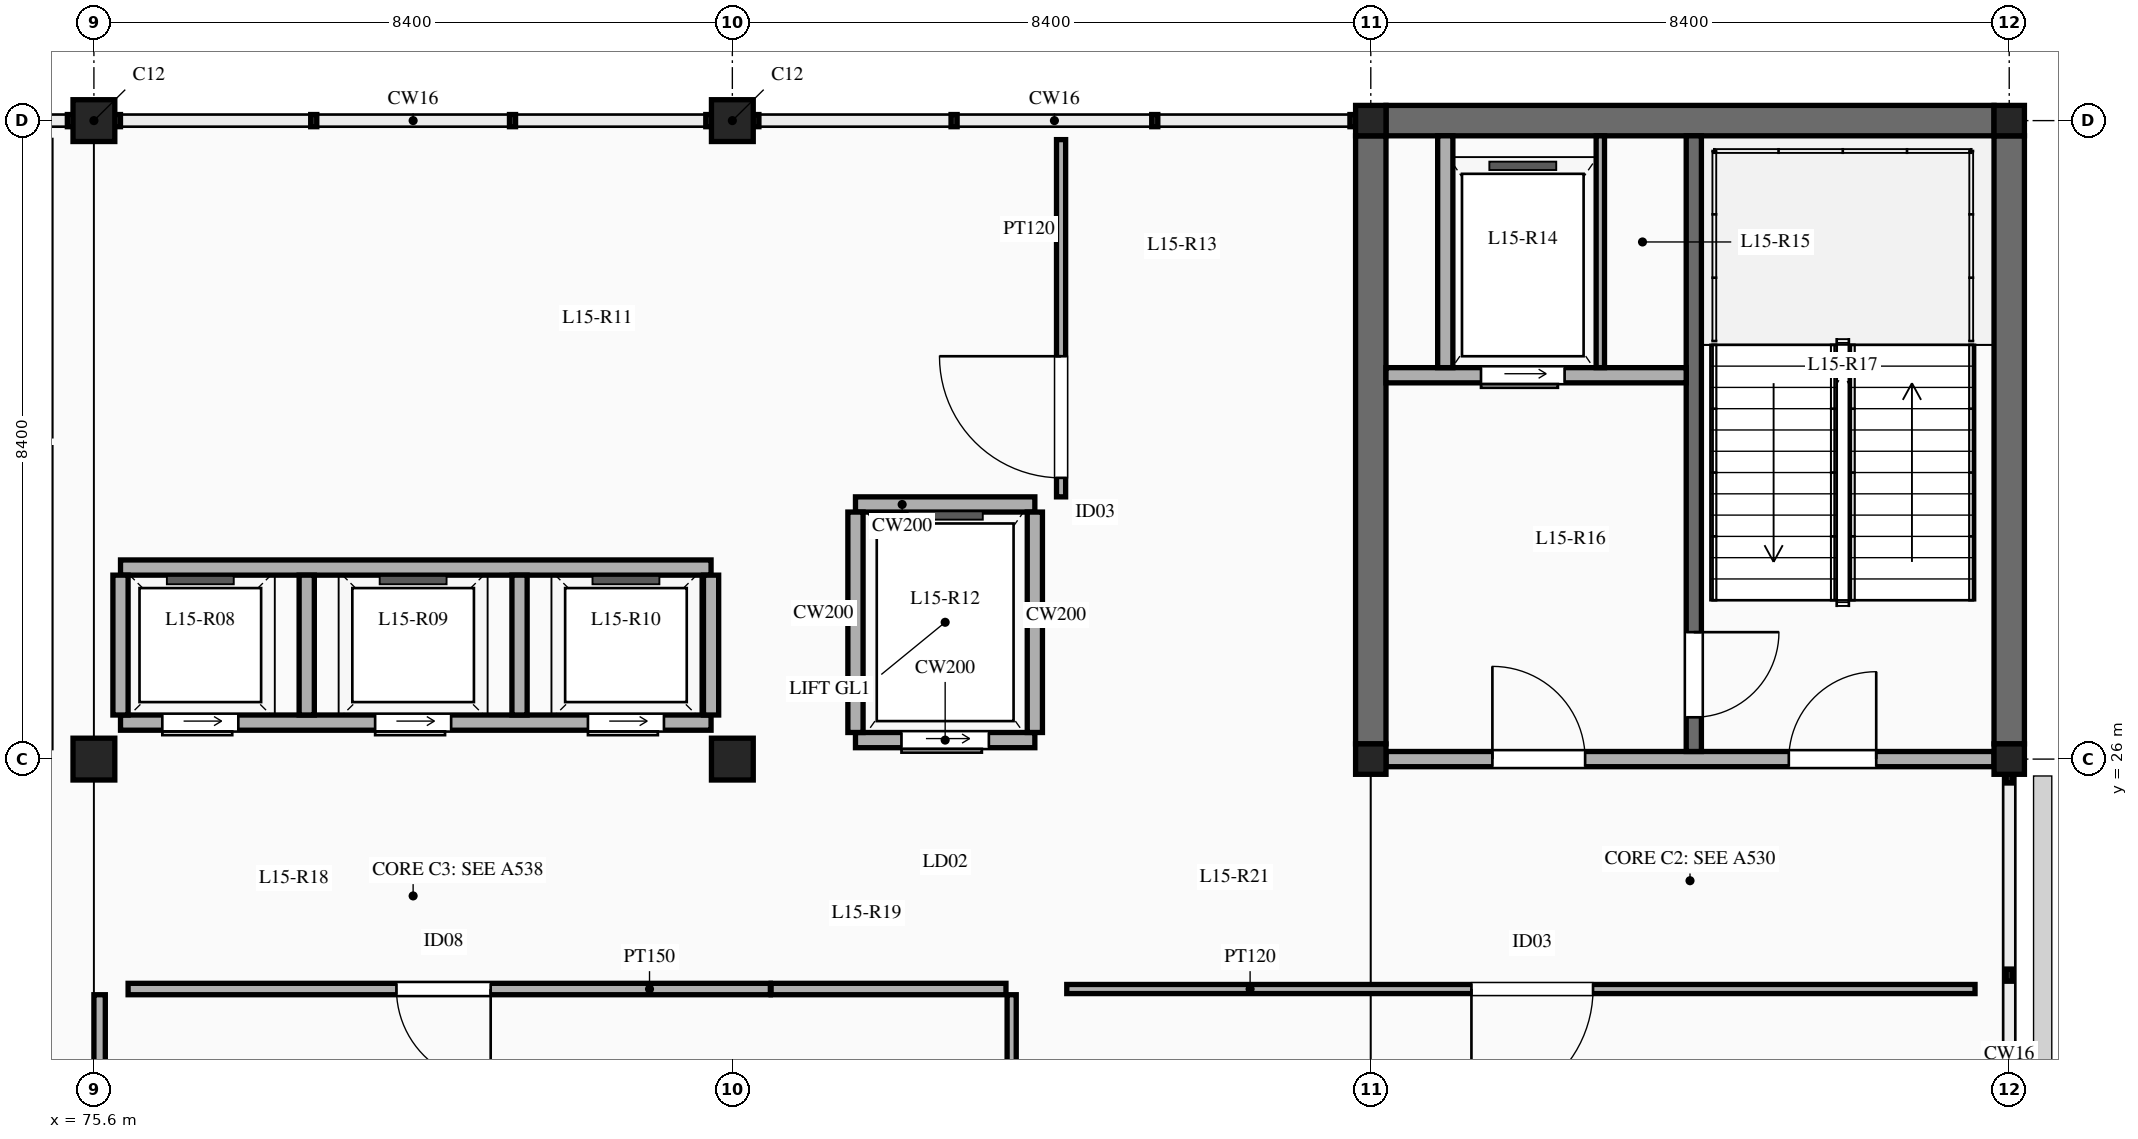
"""IFC4 building model, lengths in metres.
Left out: names, types, materials, properties, quantities, classifications, styles, units other than length and angle.
Written with IfcOpenShell. Run it as: python <this file> out.ifc"""

import sys

from ifc_helpers import new_model, si_unit, direction, frame, frame_2d, origin, origin_2d, place, context, subcontext, project, spatial, rectangle, extrude, element, fill, save


model = new_model("IFC4")
c1 = context("Model", 3, precision=1e-05, world=origin(), true_north=direction((0.0, 1.0)))
c2 = subcontext(c1, "Body", "Model", "MODEL_VIEW")
j1 = project(units=[si_unit("LENGTHUNIT", "METRE"), si_unit("PLANEANGLEUNIT", "RADIAN")], contexts=[c1])
p1 = place(None, origin())
s1 = spatial("IfcSite", under=j1, at=p1, CompositionType="ELEMENT")
p2 = place(p1, origin())
s2 = spatial("IfcBuilding", under=s1, at=p2, CompositionType="ELEMENT")
p3 = place(p2, frame((0.0, 0.0, 69.0)))
s3 = spatial("IfcBuildingStorey", under=s2, at=p3, CompositionType="ELEMENT", Elevation=69.0)
for number, where, z_axis, x_axis in (
    (1, (75.6, 26.0, 0.0), (0.0, 0.0, 1.0), (1.0, 0.0, 0.0)),
    (2, (75.6, 34.4, 0.0), (0.0, 0.0, 1.0), (1.0, 0.0, 0.0)),
    (3, (84.0, 26.0, 0.0), (0.0, 0.0, 1.0), (1.0, 0.0, 0.0)),
    (4, (84.0, 34.4, 0.0), (0.0, 0.0, 1.0), (1.0, 0.0, 0.0)),
):
    element("IfcColumn", number, at=place(p3, frame(where, z_axis=z_axis, x_axis=x_axis)), inside=s3, PredefinedType="COLUMN", context=c2, shape_type="SweptSolid", body=[
        extrude(rectangle(XDim=0.55, YDim=0.55, at=origin_2d()), origin(), (0.0, 0.0, 1.0), 4.5),
    ])
for number, where, z_axis, x_axis in (
    (5, (92.4, 26.0, 0.0), (0.0, 0.0, 1.0), (1.0, 0.0, 0.0)),
    (6, (92.4, 34.4, 0.0), (0.0, 0.0, 1.0), (1.0, 0.0, 0.0)),
    (7, (100.8, 26.0, 0.0), (0.0, 0.0, 1.0), (1.0, 0.0, 0.0)),
    (8, (100.8, 34.4, 0.0), (0.0, 0.0, 1.0), (1.0, 0.0, 0.0)),
):
    element("IfcColumn", number, at=place(p3, frame(where, z_axis=z_axis, x_axis=x_axis)), inside=s3, PredefinedType="COLUMN", context=c2, shape_type="SweptSolid", body=[
        extrude(rectangle(XDim=0.4, YDim=0.4, at=origin_2d()), origin(), (0.0, 0.0, 1.0), 4.5),
    ])
for number, where, z_axis, x_axis in (
    (9, (92.4, 26.2, 0.0), (0.0, 0.0, 1.0), (0.0, 1.0, 0.0)),
    (10, (100.8, 26.2, 0.0), (0.0, 0.0, 1.0), (0.0, 1.0, 0.0)),
    (11, (92.6, 34.4, 0.0), (0.0, 0.0, 1.0), (1.0, 0.0, 0.0)),
):
    element("IfcWall", number, at=place(p3, frame(where, z_axis=z_axis, x_axis=x_axis)), inside=s3, PredefinedType="SHEAR", context=c2, shape_type="SweptSolid", body=[
        extrude(rectangle(XDim=8.0, YDim=0.4, at=frame_2d((4.0, 0.0))), origin(), (0.0, 0.0, 1.0), 4.5),
    ])
p4 = place(p3, frame((92.6, 26.0, 0.0), z_axis=(0.0, 0.0, 1.0), x_axis=(1.0, 0.0, 0.0)))
e12 = element("IfcWall", 12, at=p4, inside=s3, PredefinedType="SOLIDWALL", context=c2, shape_type="SweptSolid", body=[
    extrude(rectangle(XDim=8.0, YDim=0.2, at=frame_2d((4.0, 0.0))), origin(), (0.0, 0.0, 1.0), 3.88),
])
p5 = place(p4, frame((1.4, 0.0, 0.0)))
e13 = element("IfcOpeningElement", 13, at=p5, cuts=e12, PredefinedType="OPENING", context=c2, shape_type="SweptSolid", body=[
    extrude(rectangle(XDim=1.22, YDim=2.15, at=frame_2d((0.61, 1.075))), frame((0.0, 0.11, 0.0), z_axis=(0.0, -1.0, 0.0), x_axis=(1.0, 0.0, 0.0)), (0.0, 0.0, 1.0), 0.22),
])
p6 = place(p4, frame((5.3, 0.0, 0.0)))
e14 = element("IfcOpeningElement", 14, at=p6, cuts=e12, PredefinedType="OPENING", context=c2, shape_type="SweptSolid", body=[
    extrude(rectangle(XDim=1.15, YDim=2.15, at=frame_2d((0.575, 1.075))), frame((0.0, 0.11, 0.0), z_axis=(0.0, -1.0, 0.0), x_axis=(1.0, 0.0, 0.0)), (0.0, 0.0, 1.0), 0.22),
])
p7 = place(p3, frame((96.65, 26.1, 0.0), z_axis=(0.0, 0.0, 1.0), x_axis=(0.0, 1.0, 0.0)))
e15 = element("IfcWall", 15, at=p7, inside=s3, PredefinedType="SOLIDWALL", context=c2, shape_type="SweptSolid", body=[
    extrude(rectangle(XDim=8.1, YDim=0.2, at=frame_2d((4.05, 0.0))), origin(), (0.0, 0.0, 1.0), 4.3),
])
p8 = place(p7, frame((0.45, 0.0, 0.0)))
e16 = element("IfcOpeningElement", 16, at=p8, cuts=e15, PredefinedType="OPENING", context=c2, shape_type="SweptSolid", body=[
    extrude(rectangle(XDim=1.12, YDim=2.15, at=frame_2d((0.56, 1.075))), frame((0.0, 0.11, 0.0), z_axis=(0.0, -1.0, 0.0), x_axis=(1.0, 0.0, 0.0)), (0.0, 0.0, 1.0), 0.22),
])
p9 = place(p3, frame((92.6, 31.05, 0.0), z_axis=(0.0, 0.0, 1.0), x_axis=(1.0, 0.0, 0.0)))
e17 = element("IfcWall", 17, at=p9, inside=s3, PredefinedType="SOLIDWALL", context=c2, shape_type="SweptSolid", body=[
    extrude(rectangle(XDim=3.95, YDim=0.2, at=frame_2d((1.975, 0.0))), origin(), (0.0, 0.0, 1.0), 4.3),
])
p10 = place(p9, frame((1.25, 0.0, 0.0)))
e18 = element("IfcOpeningElement", 18, at=p10, cuts=e17, PredefinedType="OPENING", context=c2, shape_type="SweptSolid", body=[
    extrude(rectangle(XDim=1.1, YDim=2.15, at=frame_2d((0.55, 1.075))), frame((0.0, 0.11, 0.0), z_axis=(0.0, -1.0, 0.0), x_axis=(1.0, 0.0, 0.0)), (0.0, 0.0, 1.0), 0.22),
])
p11 = place(p3, frame((95.42, 31.15, 0.0), z_axis=(0.0, 0.0, 1.0), x_axis=(0.0, 1.0, 0.0)))
e19 = element("IfcWall", 19, at=p11, inside=s3, PredefinedType="PARTITIONING", context=c2, shape_type="SweptSolid", body=[
    extrude(rectangle(XDim=3.05, YDim=0.11, at=frame_2d((1.525, 0.0))), origin(), (0.0, 0.0, 1.0), 4.3),
])
p12 = place(p3, frame((93.38, 31.15, 0.0), z_axis=(0.0, 0.0, 1.0), x_axis=(0.0, 1.0, 0.0)))
e20 = element("IfcWall", 20, at=p12, inside=s3, PredefinedType="SOLIDWALL", context=c2, shape_type="SweptSolid", body=[
    extrude(rectangle(XDim=3.05, YDim=0.2, at=frame_2d((1.525, 0.0))), origin(), (0.0, 0.0, 1.0), 4.3),
])
p13 = place(p3, frame((75.95, 26.48, 0.0), z_axis=(0.0, 0.0, 1.0), x_axis=(1.0, 0.0, 0.0)))
e21 = element("IfcWall", 21, at=p13, inside=s3, PredefinedType="SOLIDWALL", context=c2, shape_type="SweptSolid", body=[
    extrude(rectangle(XDim=7.77, YDim=0.2, at=frame_2d((3.885, 0.0))), origin(), (0.0, 0.0, 1.0), 4.3),
])
p14 = place(p13, frame((0.55, 0.0, 0.0)))
e22 = element("IfcOpeningElement", 22, at=p14, cuts=e21, PredefinedType="OPENING", context=c2, shape_type="SweptSolid", body=[
    extrude(rectangle(XDim=1.0, YDim=2.15, at=frame_2d((0.5, 1.075))), frame((0.0, 0.11, 0.0), z_axis=(0.0, -1.0, 0.0), x_axis=(1.0, 0.0, 0.0)), (0.0, 0.0, 1.0), 0.22),
])
p15 = place(p13, frame((3.35, 0.0, 0.0)))
e23 = element("IfcOpeningElement", 23, at=p15, cuts=e21, PredefinedType="OPENING", context=c2, shape_type="SweptSolid", body=[
    extrude(rectangle(XDim=1.0, YDim=2.15, at=frame_2d((0.5, 1.075))), frame((0.0, 0.11, 0.0), z_axis=(0.0, -1.0, 0.0), x_axis=(1.0, 0.0, 0.0)), (0.0, 0.0, 1.0), 0.22),
])
p16 = place(p13, frame((6.15, 0.0, 0.0)))
e24 = element("IfcOpeningElement", 24, at=p16, cuts=e21, PredefinedType="OPENING", context=c2, shape_type="SweptSolid", body=[
    extrude(rectangle(XDim=1.0, YDim=2.15, at=frame_2d((0.5, 1.075))), frame((0.0, 0.11, 0.0), z_axis=(0.0, -1.0, 0.0), x_axis=(1.0, 0.0, 0.0)), (0.0, 0.0, 1.0), 0.22),
])
p17 = place(p3, frame((75.95, 28.52, 0.0), z_axis=(0.0, 0.0, 1.0), x_axis=(1.0, 0.0, 0.0)))
e25 = element("IfcWall", 25, at=p17, inside=s3, PredefinedType="SOLIDWALL", context=c2, shape_type="SweptSolid", body=[
    extrude(rectangle(XDim=7.77, YDim=0.2, at=frame_2d((3.885, 0.0))), origin(), (0.0, 0.0, 1.0), 4.3),
])
for number, where, z_axis, x_axis in (
    (26, (75.95, 26.58, 0.0), (0.0, 0.0, 1.0), (0.0, 1.0, 0.0)),
    (27, (78.4, 26.58, 0.0), (0.0, 0.0, 1.0), (0.0, 1.0, 0.0)),
    (28, (81.2, 26.58, 0.0), (0.0, 0.0, 1.0), (0.0, 1.0, 0.0)),
):
    element("IfcWall", number, at=place(p3, frame(where, z_axis=z_axis, x_axis=x_axis)), inside=s3, PredefinedType="SOLIDWALL", context=c2, shape_type="SweptSolid", body=[
        extrude(rectangle(XDim=1.84, YDim=0.2, at=frame_2d((0.92, 0.0))), origin(), (0.0, 0.0, 1.0), 4.3),
    ])
p18 = place(p3, frame((83.72, 26.58, 0.0), z_axis=(0.0, 0.0, 1.0), x_axis=(0.0, 1.0, 0.0)))
e29 = element("IfcWall", 29, at=p18, inside=s3, PredefinedType="SOLIDWALL", context=c2, shape_type="SweptSolid", body=[
    extrude(rectangle(XDim=1.84, YDim=0.2, at=frame_2d((0.92, 0.0))), origin(), (0.0, 0.0, 1.0), 3.93),
])
p19 = place(p3, frame((85.62, 26.25, 0.0), z_axis=(0.0, 0.0, 1.0), x_axis=(1.0, 0.0, 0.0)))
e30 = element("IfcWall", 30, at=p19, inside=s3, PredefinedType="SOLIDWALL", context=c2, shape_type="SweptSolid", body=[
    extrude(rectangle(XDim=2.36, YDim=0.2, at=frame_2d((1.18, 0.0))), origin(), (0.0, 0.0, 1.0), 3.88),
])
p20 = place(p19, frame((0.605, 0.0, 0.0)))
e31 = element("IfcOpeningElement", 31, at=p20, cuts=e30, PredefinedType="OPENING", context=c2, shape_type="SweptSolid", body=[
    extrude(rectangle(XDim=1.15, YDim=2.2, at=frame_2d((0.575, 1.1))), frame((0.0, 0.11, 0.0), z_axis=(0.0, -1.0, 0.0), x_axis=(1.0, 0.0, 0.0)), (0.0, 0.0, 1.0), 0.22),
])
p21 = place(p3, frame((85.62, 29.35, 0.0), z_axis=(0.0, 0.0, 1.0), x_axis=(1.0, 0.0, 0.0)))
e32 = element("IfcWall", 32, at=p21, inside=s3, PredefinedType="SOLIDWALL", context=c2, shape_type="SweptSolid", body=[
    extrude(rectangle(XDim=2.36, YDim=0.2, at=frame_2d((1.18, 0.0))), origin(), (0.0, 0.0, 1.0), 4.3),
])
p22 = place(p3, frame((85.62, 26.35, 0.0), z_axis=(0.0, 0.0, 1.0), x_axis=(0.0, 1.0, 0.0)))
e33 = element("IfcWall", 33, at=p22, inside=s3, PredefinedType="SOLIDWALL", context=c2, shape_type="SweptSolid", body=[
    extrude(rectangle(XDim=2.9, YDim=0.2, at=frame_2d((1.45, 0.0))), origin(), (0.0, 0.0, 1.0), 4.3),
])
p23 = place(p3, frame((87.98, 26.35, 0.0), z_axis=(0.0, 0.0, 1.0), x_axis=(0.0, 1.0, 0.0)))
e34 = element("IfcWall", 34, at=p23, inside=s3, PredefinedType="SOLIDWALL", context=c2, shape_type="SweptSolid", body=[
    extrude(rectangle(XDim=2.9, YDim=0.2, at=frame_2d((1.45, 0.0))), origin(), (0.0, 0.0, 1.0), 4.03),
])
p24 = place(p3, frame((88.325, 29.45, 0.0), z_axis=(0.0, 0.0, 1.0), x_axis=(0.0, 1.0, 0.0)))
e35 = element("IfcWall", 35, at=p24, inside=s3, PredefinedType="PARTITIONING", context=c2, shape_type="SweptSolid", body=[
    extrude(rectangle(XDim=4.7, YDim=0.12, at=frame_2d((2.35, 0.0))), origin(), (0.0, 0.0, 1.0), 3.45),
])
p25 = place(p24, frame((0.25, 0.0, 0.0)))
e36 = element("IfcOpeningElement", 36, at=p25, cuts=e35, PredefinedType="OPENING", context=c2, shape_type="SweptSolid", body=[
    extrude(rectangle(XDim=1.6, YDim=2.35, at=frame_2d((0.8, 1.175))), frame((0.0, 0.07, 0.0), z_axis=(0.0, -1.0, 0.0), x_axis=(1.0, 0.0, 0.0)), (0.0, 0.0, 1.0), 0.14),
])
p26 = place(p3, frame((76.05, 22.975, 0.0), z_axis=(0.0, 0.0, 1.0), x_axis=(1.0, 0.0, 0.0)))
e37 = element("IfcWall", 37, at=p26, inside=s3, PredefinedType="PARTITIONING", context=c2, shape_type="SweptSolid", body=[
    extrude(rectangle(XDim=8.45, YDim=0.15, at=frame_2d((4.225, 0.0))), origin(), (0.0, 0.0, 1.0), 3.45),
])
p27 = place(p26, frame((3.531, 0.0, 0.0)))
e38 = element("IfcOpeningElement", 38, at=p27, cuts=e37, PredefinedType="OPENING", context=c2, shape_type="SweptSolid", body=[
    extrude(rectangle(XDim=1.24, YDim=2.2, at=frame_2d((0.62, 1.1))), frame((0.0, 0.085, 0.0), z_axis=(0.0, -1.0, 0.0), x_axis=(1.0, 0.0, 0.0)), (0.0, 0.0, 1.0), 0.17),
])
p28 = place(p3, frame((84.51, 22.975, 0.0), z_axis=(0.0, 0.0, 1.0), x_axis=(1.0, 0.0, 0.0)))
e39 = element("IfcWall", 39, at=p28, inside=s3, PredefinedType="PARTITIONING", context=c2, shape_type="SweptSolid", body=[
    extrude(rectangle(XDim=3.09, YDim=0.15, at=frame_2d((1.545, 0.0))), origin(), (0.0, 0.0, 1.0), 3.45),
])
p29 = place(p3, frame((88.4, 22.975, 0.0), z_axis=(0.0, 0.0, 1.0), x_axis=(1.0, 0.0, 0.0)))
e40 = element("IfcWall", 40, at=p29, inside=s3, PredefinedType="PARTITIONING", context=c2, shape_type="SweptSolid", body=[
    extrude(rectangle(XDim=11.95, YDim=0.12, at=frame_2d((5.975, 0.0))), origin(), (0.0, 0.0, 1.0), 3.45),
])
p30 = place(p29, frame((5.324, 0.0, 0.0)))
e41 = element("IfcOpeningElement", 41, at=p30, cuts=e40, PredefinedType="OPENING", context=c2, shape_type="SweptSolid", body=[
    extrude(rectangle(XDim=1.6, YDim=2.35, at=frame_2d((0.8, 1.175))), frame((0.0, 0.07, 0.0), z_axis=(0.0, -1.0, 0.0), x_axis=(1.0, 0.0, 0.0)), (0.0, 0.0, 1.0), 0.14),
])
p31 = place(p3, frame((75.675, 18.2, 0.0), z_axis=(0.0, 0.0, 1.0), x_axis=(0.0, 1.0, 0.0)))
e42 = element("IfcWall", 42, at=p31, inside=s3, PredefinedType="PARTITIONING", context=c2, shape_type="SweptSolid", body=[
    extrude(rectangle(XDim=4.7, YDim=0.15, at=frame_2d((2.35, 0.0))), origin(), (0.0, 0.0, 1.0), 3.45),
])
p32 = place(p3, frame((87.675, 18.2, 0.0), z_axis=(0.0, 0.0, 1.0), x_axis=(0.0, 1.0, 0.0)))
e43 = element("IfcWall", 43, at=p32, inside=s3, PredefinedType="PARTITIONING", context=c2, shape_type="SweptSolid", body=[
    extrude(rectangle(XDim=4.7, YDim=0.12, at=frame_2d((2.35, 0.0))), origin(), (0.0, 0.0, 1.0), 3.45),
])
p33 = place(p5, origin())
e44 = element("IfcDoor", 44, at=p33, inside=s3, OperationType="SINGLE_SWING_LEFT", PredefinedType="DOOR", context=c2, shape_type="SweptSolid", body=[
    extrude(rectangle(XDim=1.22, YDim=2.15, at=frame_2d((0.61, 1.075))), frame((0.0, 0.025, 0.0), z_axis=(0.0, -1.0, 0.0), x_axis=(1.0, 0.0, 0.0)), (0.0, 0.0, 1.0), 0.05),
])
fill(e13, e44)
p34 = place(p6, origin())
e45 = element("IfcDoor", 45, at=p34, inside=s3, OperationType="SINGLE_SWING_RIGHT", PredefinedType="DOOR", context=c2, shape_type="SweptSolid", body=[
    extrude(rectangle(XDim=1.15, YDim=2.15, at=frame_2d((0.575, 1.075))), frame((0.0, 0.025, 0.0), z_axis=(0.0, -1.0, 0.0), x_axis=(1.0, 0.0, 0.0)), (0.0, 0.0, 1.0), 0.05),
])
fill(e14, e45)
p35 = place(p8, frame((1.12, 0.0, 0.0), z_axis=(0.0, 0.0, 1.0), x_axis=(-1.0, 0.0, 0.0)))
e46 = element("IfcDoor", 46, at=p35, inside=s3, OperationType="SINGLE_SWING_LEFT", PredefinedType="DOOR", context=c2, shape_type="SweptSolid", body=[
    extrude(rectangle(XDim=1.12, YDim=2.15, at=frame_2d((0.56, 1.075))), frame((0.0, 0.025, 0.0), z_axis=(0.0, -1.0, 0.0), x_axis=(1.0, 0.0, 0.0)), (0.0, 0.0, 1.0), 0.05),
])
fill(e16, e46)
p36 = place(p10, frame((1.1, 0.0, 0.0), z_axis=(0.0, 0.0, 1.0), x_axis=(-1.0, 0.0, 0.0)))
e47 = element("IfcDoor", 47, at=p36, inside=s3, OperationType="SLIDING_TO_LEFT", PredefinedType="DOOR", context=c2, shape_type="SweptSolid", body=[
    extrude(rectangle(XDim=1.1, YDim=2.15, at=frame_2d((0.55, 1.075))), frame((0.0, 0.025, 0.0), z_axis=(0.0, -1.0, 0.0), x_axis=(1.0, 0.0, 0.0)), (0.0, 0.0, 1.0), 0.05),
])
fill(e18, e47)
p37 = place(p14, frame((1.0, 0.0, 0.0), z_axis=(0.0, 0.0, 1.0), x_axis=(-1.0, 0.0, 0.0)))
e48 = element("IfcDoor", 48, at=p37, inside=s3, OperationType="SLIDING_TO_LEFT", PredefinedType="DOOR", context=c2, shape_type="SweptSolid", body=[
    extrude(rectangle(XDim=1.0, YDim=2.15, at=frame_2d((0.5, 1.075))), frame((0.0, 0.025, 0.0), z_axis=(0.0, -1.0, 0.0), x_axis=(1.0, 0.0, 0.0)), (0.0, 0.0, 1.0), 0.05),
])
fill(e22, e48)
p38 = place(p15, frame((1.0, 0.0, 0.0), z_axis=(0.0, 0.0, 1.0), x_axis=(-1.0, 0.0, 0.0)))
e49 = element("IfcDoor", 49, at=p38, inside=s3, OperationType="SLIDING_TO_LEFT", PredefinedType="DOOR", context=c2, shape_type="SweptSolid", body=[
    extrude(rectangle(XDim=1.0, YDim=2.15, at=frame_2d((0.5, 1.075))), frame((0.0, 0.025, 0.0), z_axis=(0.0, -1.0, 0.0), x_axis=(1.0, 0.0, 0.0)), (0.0, 0.0, 1.0), 0.05),
])
fill(e23, e49)
p39 = place(p16, frame((1.0, 0.0, 0.0), z_axis=(0.0, 0.0, 1.0), x_axis=(-1.0, 0.0, 0.0)))
e50 = element("IfcDoor", 50, at=p39, inside=s3, OperationType="SLIDING_TO_LEFT", PredefinedType="DOOR", context=c2, shape_type="SweptSolid", body=[
    extrude(rectangle(XDim=1.0, YDim=2.15, at=frame_2d((0.5, 1.075))), frame((0.0, 0.025, 0.0), z_axis=(0.0, -1.0, 0.0), x_axis=(1.0, 0.0, 0.0)), (0.0, 0.0, 1.0), 0.05),
])
fill(e24, e50)
p40 = place(p20, frame((1.15, 0.0, 0.0), z_axis=(0.0, 0.0, 1.0), x_axis=(-1.0, 0.0, 0.0)))
e51 = element("IfcDoor", 51, at=p40, inside=s3, OperationType="SLIDING_TO_LEFT", PredefinedType="DOOR", context=c2, shape_type="SweptSolid", body=[
    extrude(rectangle(XDim=1.15, YDim=2.2, at=frame_2d((0.575, 1.1))), frame((0.0, 0.025, 0.0), z_axis=(0.0, -1.0, 0.0), x_axis=(1.0, 0.0, 0.0)), (0.0, 0.0, 1.0), 0.05),
])
fill(e31, e51)
p41 = place(p25, origin())
e52 = element("IfcDoor", 52, at=p41, inside=s3, OperationType="SINGLE_SWING_RIGHT", PredefinedType="DOOR", context=c2, shape_type="SweptSolid", body=[
    extrude(rectangle(XDim=1.6, YDim=2.35, at=frame_2d((0.8, 1.175))), frame((0.0, 0.025, 0.0), z_axis=(0.0, -1.0, 0.0), x_axis=(1.0, 0.0, 0.0)), (0.0, 0.0, 1.0), 0.05),
])
fill(e36, e52)
p42 = place(p27, frame((1.24, 0.0, 0.0), z_axis=(0.0, 0.0, 1.0), x_axis=(-1.0, 0.0, 0.0)))
e53 = element("IfcDoor", 53, at=p42, inside=s3, OperationType="SINGLE_SWING_LEFT", PredefinedType="DOOR", context=c2, shape_type="SweptSolid", body=[
    extrude(rectangle(XDim=1.24, YDim=2.2, at=frame_2d((0.62, 1.1))), frame((0.0, 0.025, 0.0), z_axis=(0.0, -1.0, 0.0), x_axis=(1.0, 0.0, 0.0)), (0.0, 0.0, 1.0), 0.05),
])
fill(e38, e53)
p43 = place(p30, frame((1.6, 0.0, 0.0), z_axis=(0.0, 0.0, 1.0), x_axis=(-1.0, 0.0, 0.0)))
e54 = element("IfcDoor", 54, at=p43, inside=s3, OperationType="SINGLE_SWING_RIGHT", PredefinedType="DOOR", context=c2, shape_type="SweptSolid", body=[
    extrude(rectangle(XDim=1.6, YDim=2.35, at=frame_2d((0.8, 1.175))), frame((0.0, 0.025, 0.0), z_axis=(0.0, -1.0, 0.0), x_axis=(1.0, 0.0, 0.0)), (0.0, 0.0, 1.0), 0.05),
])
fill(e41, e54)
save(model, sys.argv[1])
